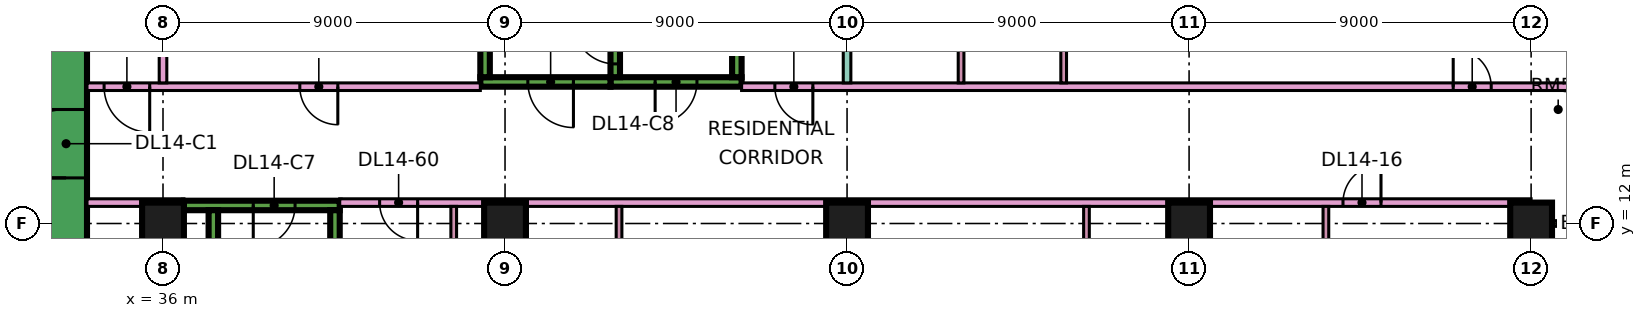
"""IFC4 building model, lengths in metres.
Left out: names, types, materials, properties, quantities, classifications, styles, units other than length and angle.
Written with IfcOpenShell. Run it as: python <this file> out.ifc"""

import sys

from ifc_helpers import new_model, si_unit, direction, frame, frame_2d, origin, origin_2d, place, context, subcontext, project, spatial, rectangle, extrude, element, fill, save


model = new_model("IFC4")
c1 = context("Model", 3, precision=1e-05, world=origin(), true_north=direction((0.0, 1.0)))
c2 = subcontext(c1, "Body", "Model", "MODEL_VIEW")
j1 = project(units=[si_unit("LENGTHUNIT", "METRE"), si_unit("PLANEANGLEUNIT", "RADIAN")], contexts=[c1])
p1 = place(None, origin())
s1 = spatial("IfcSite", under=j1, at=p1, CompositionType="ELEMENT")
p2 = place(p1, origin())
s2 = spatial("IfcBuilding", under=s1, at=p2, CompositionType="ELEMENT")
p3 = place(p2, frame((0.0, 0.0, 67.65)))
s3 = spatial("IfcBuildingStorey", under=s2, at=p3, CompositionType="ELEMENT", Elevation=67.65)
for number, where, z_axis, x_axis in (
    (1, (36.0, 12.0, 0.0), (0.0, 0.0, 1.0), (1.0, 0.0, 0.0)),
    (2, (45.0, 12.0, 0.0), (0.0, 0.0, 1.0), (1.0, 0.0, 0.0)),
    (3, (54.0, 12.0, 0.0), (0.0, 0.0, 1.0), (1.0, 0.0, 0.0)),
    (4, (63.0, 12.0, 0.0), (0.0, 0.0, 1.0), (1.0, 0.0, 0.0)),
    (5, (72.0, 12.0, 0.0), (0.0, 0.0, 1.0), (1.0, 0.0, 0.0)),
):
    element("IfcColumn", number, at=place(p3, frame(where, z_axis=z_axis, x_axis=x_axis)), inside=s3, PredefinedType="COLUMN", context=c2, shape_type="SweptSolid", body=[
        extrude(rectangle(XDim=1.1, YDim=1.1, at=origin_2d()), origin(), (0.0, 0.0, 1.0), 3.75),
    ])
p4 = place(p3, frame((33.45, 8.1, 0.0), z_axis=(0.0, 0.0, 1.0), x_axis=(0.0, 1.0, 0.0)))
e6 = element("IfcWall", 6, at=p4, inside=s3, PredefinedType="SHEAR", context=c2, shape_type="SweptSolid", body=[
    extrude(rectangle(XDim=10.8, YDim=1.1, at=frame_2d((5.4, 0.0))), origin(), (0.0, 0.0, 1.0), 3.75),
])
p5 = place(p4, frame((5.1, 0.0, 0.0)))
e7 = element("IfcOpeningElement", 7, at=p5, cuts=e6, PredefinedType="OPENING", context=c2, shape_type="SweptSolid", body=[
    extrude(rectangle(XDim=1.8, YDim=2.4, at=frame_2d((0.9, 1.2))), frame((0.0, 0.56, 0.0), z_axis=(0.0, -1.0, 0.0), x_axis=(1.0, 0.0, 0.0)), (0.0, 0.0, 1.0), 1.12),
])
p6 = place(p3, frame((36.55, 12.475, 0.0), z_axis=(0.0, 0.0, 1.0), x_axis=(1.0, 0.0, 0.0)))
e8 = element("IfcWall", 8, at=p6, inside=s3, PredefinedType="SHEAR", context=c2, shape_type="SweptSolid", body=[
    extrude(rectangle(XDim=4.1, YDim=0.25, at=frame_2d((2.05, 0.0))), origin(), (0.0, 0.0, 1.0), 3.75),
])
p7 = place(p6, frame((1.825, 0.0, 0.0)))
e9 = element("IfcOpeningElement", 9, at=p7, cuts=e8, PredefinedType="OPENING", context=c2, shape_type="SweptSolid", body=[
    extrude(rectangle(XDim=1.1, YDim=2.2, at=frame_2d((0.55, 1.1))), frame((0.0, 0.135, 0.0), z_axis=(0.0, -1.0, 0.0), x_axis=(1.0, 0.0, 0.0)), (0.0, 0.0, 1.0), 0.27),
])
for number, where, z_axis, x_axis in (
    (10, (37.325, 5.85, 0.0), (0.0, 0.0, 1.0), (0.0, 1.0, 0.0)),
    (11, (40.525, 5.85, 0.0), (0.0, 0.0, 1.0), (0.0, 1.0, 0.0)),
):
    element("IfcWall", number, at=place(p3, frame(where, z_axis=z_axis, x_axis=x_axis)), inside=s3, PredefinedType="SHEAR", context=c2, shape_type="SweptSolid", body=[
        extrude(rectangle(XDim=6.5, YDim=0.25, at=frame_2d((3.25, 0.0))), origin(), (0.0, 0.0, 1.0), 3.75),
    ])
p8 = place(p3, frame((47.775, 15.725, 0.0), z_axis=(0.0, 0.0, 1.0), x_axis=(1.0, 0.0, 0.0)))
e12 = element("IfcWall", 12, at=p8, inside=s3, PredefinedType="SHEAR", context=c2, shape_type="SweptSolid", body=[
    extrude(rectangle(XDim=3.45, YDim=0.25, at=frame_2d((1.725, 0.0))), origin(), (0.0, 0.0, 1.0), 3.75),
])
p9 = place(p8, frame((1.175, 0.0, 0.0)))
e13 = element("IfcOpeningElement", 13, at=p9, cuts=e12, PredefinedType="OPENING", context=c2, shape_type="SweptSolid", body=[
    extrude(rectangle(XDim=1.1, YDim=2.2, at=frame_2d((0.55, 1.1))), frame((0.0, 0.135, 0.0), z_axis=(0.0, -1.0, 0.0), x_axis=(1.0, 0.0, 0.0)), (0.0, 0.0, 1.0), 0.27),
])
p10 = place(p3, frame((47.9, 15.85, 0.0), z_axis=(0.0, 0.0, 1.0), x_axis=(0.0, 1.0, 0.0)))
e14 = element("IfcWall", 14, at=p10, inside=s3, PredefinedType="SHEAR", context=c2, shape_type="SweptSolid", body=[
    extrude(rectangle(XDim=6.5, YDim=0.25, at=frame_2d((3.25, 0.0))), origin(), (0.0, 0.0, 1.0), 3.75),
])
p11 = place(p10, frame((0.35, 0.0, 0.0)))
e15 = element("IfcOpeningElement", 15, at=p11, cuts=e14, PredefinedType="OPENING", context=c2, shape_type="SweptSolid", body=[
    extrude(rectangle(XDim=1.1, YDim=2.2, at=frame_2d((0.55, 1.1))), frame((0.0, 0.135, 0.0), z_axis=(0.0, -1.0, 0.0), x_axis=(1.0, 0.0, 0.0)), (0.0, 0.0, 1.0), 0.27),
])
p12 = place(p3, frame((51.1, 15.85, 0.0), z_axis=(0.0, 0.0, 1.0), x_axis=(0.0, 1.0, 0.0)))
e16 = element("IfcWall", 16, at=p12, inside=s3, PredefinedType="SHEAR", context=c2, shape_type="SweptSolid", body=[
    extrude(rectangle(XDim=6.5, YDim=0.25, at=frame_2d((3.25, 0.0))), origin(), (0.0, 0.0, 1.0), 3.75),
])
p13 = place(p3, frame((44.35, 15.725, 0.0), z_axis=(0.0, 0.0, 1.0), x_axis=(1.0, 0.0, 0.0)))
e17 = element("IfcWall", 17, at=p13, inside=s3, PredefinedType="SHEAR", context=c2, shape_type="SweptSolid", body=[
    extrude(rectangle(XDim=3.425, YDim=0.25, at=frame_2d((1.712, 0.0))), origin(), (0.0, 0.0, 1.0), 3.75),
])
p14 = place(p13, frame((1.25, 0.0, 0.0)))
e18 = element("IfcOpeningElement", 18, at=p14, cuts=e17, PredefinedType="OPENING", context=c2, shape_type="SweptSolid", body=[
    extrude(rectangle(XDim=1.2, YDim=2.2, at=frame_2d((0.6, 1.1))), frame((0.0, 0.135, 0.0), z_axis=(0.0, -1.0, 0.0), x_axis=(1.0, 0.0, 0.0)), (0.0, 0.0, 1.0), 0.27),
])
p15 = place(p3, frame((44.475, 15.85, 0.0), z_axis=(0.0, 0.0, 1.0), x_axis=(0.0, 1.0, 0.0)))
e19 = element("IfcWall", 19, at=p15, inside=s3, PredefinedType="SHEAR", context=c2, shape_type="SweptSolid", body=[
    extrude(rectangle(XDim=6.5, YDim=0.25, at=frame_2d((3.25, 0.0))), origin(), (0.0, 0.0, 1.0), 3.75),
])
p16 = place(p15, frame((1.75, 0.0, 0.0)))
e20 = element("IfcOpeningElement", 20, at=p16, cuts=e19, PredefinedType="OPENING", context=c2, shape_type="SweptSolid", body=[
    extrude(rectangle(XDim=1.1, YDim=2.2, at=frame_2d((0.55, 1.1))), frame((0.0, 0.135, 0.0), z_axis=(0.0, -1.0, 0.0), x_axis=(1.0, 0.0, 0.0)), (0.0, 0.0, 1.0), 0.27),
])
p17 = place(p15, frame((4.3, 0.0, 0.0)))
e21 = element("IfcOpeningElement", 21, at=p17, cuts=e19, PredefinedType="OPENING", context=c2, shape_type="SweptSolid", body=[
    extrude(rectangle(XDim=1.1, YDim=2.2, at=frame_2d((0.55, 1.1))), frame((0.0, 0.135, 0.0), z_axis=(0.0, -1.0, 0.0), x_axis=(1.0, 0.0, 0.0)), (0.0, 0.0, 1.0), 0.27),
])
p18 = place(p3, frame((72.0, 1.575, 0.0), z_axis=(0.0, 0.0, 1.0), x_axis=(0.0, 1.0, 0.0)))
e22 = element("IfcWall", 22, at=p18, inside=s3, PredefinedType="SOLIDWALL", context=c2, shape_type="SweptSolid", body=[
    extrude(rectangle(XDim=10.35, YDim=0.15, at=frame_2d((5.175, 0.0))), origin(), (0.0, 0.0, 1.0), 3.35),
])
p19 = place(p18, frame((1.587, 0.0, 0.0)))
e23 = element("IfcOpeningElement", 23, at=p19, cuts=e22, PredefinedType="OPENING", context=c2, shape_type="SweptSolid", body=[
    extrude(rectangle(XDim=1.8, YDim=2.4, at=frame_2d((0.9, 1.2))), frame((0.0, 0.085, 0.0), z_axis=(0.0, -1.0, 0.0), x_axis=(1.0, 0.0, 0.0)), (0.0, 0.0, 1.0), 0.17),
])
p20 = place(p18, frame((5.875, 0.0, 0.45)))
e24 = element("IfcOpeningElement", 24, at=p20, cuts=e22, PredefinedType="OPENING", context=c2, shape_type="SweptSolid", body=[
    extrude(rectangle(XDim=3.0, YDim=2.4, at=frame_2d((1.5, 1.2))), frame((0.0, 0.085, 0.0), z_axis=(0.0, -1.0, 0.0), x_axis=(1.0, 0.0, 0.0)), (0.0, 0.0, 1.0), 0.17),
])
p21 = place(p3, frame((73.5, 12.0, 0.0), z_axis=(0.0, 0.0, 1.0), x_axis=(-1.0, 0.0, 0.0)))
e25 = element("IfcWall", 25, at=p21, inside=s3, PredefinedType="SOLIDWALL", context=c2, shape_type="SweptSolid", body=[
    extrude(rectangle(XDim=1.5, YDim=0.15, at=frame_2d((0.75, 0.0))), origin(), (0.0, 0.0, 1.0), 3.35),
])
p22 = place(p3, frame((34.0, 12.55, 0.0), z_axis=(0.0, 0.0, 1.0), x_axis=(1.0, 0.0, 0.0)))
e26 = element("IfcWall", 26, at=p22, inside=s3, PredefinedType="PARTITIONING", context=c2, shape_type="SweptSolid", body=[
    extrude(rectangle(XDim=2.551, YDim=0.2, at=frame_2d((1.275, 0.0))), origin(), (0.0, 0.0, 1.0), 3.35),
])
p23 = place(p3, frame((34.0, 15.6, 0.0), z_axis=(0.0, 0.0, 1.0), x_axis=(1.0, 0.0, 0.0)))
e27 = element("IfcWall", 27, at=p23, inside=s3, PredefinedType="PARTITIONING", context=c2, shape_type="SweptSolid", body=[
    extrude(rectangle(XDim=10.35, YDim=0.2, at=frame_2d((5.175, 0.0))), origin(), (0.0, 0.0, 1.0), 3.35),
])
p24 = place(p23, frame((5.6, 0.0, 0.0)))
e28 = element("IfcOpeningElement", 28, at=p24, cuts=e27, PredefinedType="OPENING", context=c2, shape_type="SweptSolid", body=[
    extrude(rectangle(XDim=1.0, YDim=2.1, at=frame_2d((0.5, 1.05))), frame((0.0, 0.11, 0.0), z_axis=(0.0, -1.0, 0.0), x_axis=(1.0, 0.0, 0.0)), (0.0, 0.0, 1.0), 0.22),
])
p25 = place(p23, frame((0.45, 0.0, 0.0)))
e29 = element("IfcOpeningElement", 29, at=p25, cuts=e27, PredefinedType="OPENING", context=c2, shape_type="SweptSolid", body=[
    extrude(rectangle(XDim=1.2, YDim=2.1, at=frame_2d((0.6, 1.05))), frame((0.0, 0.11, 0.0), z_axis=(0.0, -1.0, 0.0), x_axis=(1.0, 0.0, 0.0)), (0.0, 0.0, 1.0), 0.22),
])
p26 = place(p3, frame((36.0, 15.7, 0.0), z_axis=(0.0, 0.0, 1.0), x_axis=(0.0, 1.0, 0.0)))
e30 = element("IfcWall", 30, at=p26, inside=s3, PredefinedType="PARTITIONING", context=c2, shape_type="SweptSolid", body=[
    extrude(rectangle(XDim=8.3, YDim=0.2, at=frame_2d((4.15, 0.0))), origin(), (0.0, 0.0, 1.0), 3.35),
])
p27 = place(p3, frame((40.65, 12.55, 0.0), z_axis=(0.0, 0.0, 1.0), x_axis=(1.0, 0.0, 0.0)))
e31 = element("IfcWall", 31, at=p27, inside=s3, PredefinedType="PARTITIONING", context=c2, shape_type="SweptSolid", body=[
    extrude(rectangle(XDim=31.35, YDim=0.2, at=frame_2d((15.675, 0.0))), origin(), (0.0, 0.0, 1.0), 3.35),
])
p28 = place(p27, frame((26.4, 0.0, 0.0)))
e32 = element("IfcOpeningElement", 32, at=p28, cuts=e31, PredefinedType="OPENING", context=c2, shape_type="SweptSolid", body=[
    extrude(rectangle(XDim=1.0, YDim=2.1, at=frame_2d((0.5, 1.05))), frame((0.0, 0.11, 0.0), z_axis=(0.0, -1.0, 0.0), x_axis=(1.0, 0.0, 0.0)), (0.0, 0.0, 1.0), 0.22),
])
p29 = place(p27, frame((1.05, 0.0, 0.0)))
e33 = element("IfcOpeningElement", 33, at=p29, cuts=e31, PredefinedType="OPENING", context=c2, shape_type="SweptSolid", body=[
    extrude(rectangle(XDim=1.0, YDim=2.1, at=frame_2d((0.5, 1.05))), frame((0.0, 0.11, 0.0), z_axis=(0.0, -1.0, 0.0), x_axis=(1.0, 0.0, 0.0)), (0.0, 0.0, 1.0), 0.22),
])
p30 = place(p3, frame((43.65, 5.975, 0.0), z_axis=(0.0, 0.0, 1.0), x_axis=(0.0, 1.0, 0.0)))
e34 = element("IfcWall", 34, at=p30, inside=s3, PredefinedType="PARTITIONING", context=c2, shape_type="SweptSolid", body=[
    extrude(rectangle(XDim=6.475, YDim=0.15, at=frame_2d((3.237, 0.0))), origin(), (0.0, 0.0, 1.0), 3.35),
])
p31 = place(p30, frame((4.275, 0.0, 0.0)))
e35 = element("IfcOpeningElement", 35, at=p31, cuts=e34, PredefinedType="OPENING", context=c2, shape_type="SweptSolid", body=[
    extrude(rectangle(XDim=0.9, YDim=2.1, at=frame_2d((0.45, 1.05))), frame((0.0, 0.085, 0.0), z_axis=(0.0, -1.0, 0.0), x_axis=(1.0, 0.0, 0.0)), (0.0, 0.0, 1.0), 0.17),
])
p32 = place(p3, frame((48.0, 5.975, 0.0), z_axis=(0.0, 0.0, 1.0), x_axis=(0.0, 1.0, 0.0)))
e36 = element("IfcWall", 36, at=p32, inside=s3, PredefinedType="PARTITIONING", context=c2, shape_type="SweptSolid", body=[
    extrude(rectangle(XDim=6.475, YDim=0.15, at=frame_2d((3.237, 0.0))), origin(), (0.0, 0.0, 1.0), 3.35),
])
p33 = place(p3, frame((51.225, 15.6, 0.0), z_axis=(0.0, 0.0, 1.0), x_axis=(1.0, 0.0, 0.0)))
e37 = element("IfcWall", 37, at=p33, inside=s3, PredefinedType="PARTITIONING", context=c2, shape_type="SweptSolid", body=[
    extrude(rectangle(XDim=22.125, YDim=0.2, at=frame_2d((11.062, 0.0))), origin(), (0.0, 0.0, 1.0), 3.35),
])
p34 = place(p33, frame((18.725, 0.0, 0.0)))
e38 = element("IfcOpeningElement", 38, at=p34, cuts=e37, PredefinedType="OPENING", context=c2, shape_type="SweptSolid", body=[
    extrude(rectangle(XDim=1.0, YDim=2.1, at=frame_2d((0.5, 1.05))), frame((0.0, 0.11, 0.0), z_axis=(0.0, -1.0, 0.0), x_axis=(1.0, 0.0, 0.0)), (0.0, 0.0, 1.0), 0.22),
])
p35 = place(p33, frame((0.875, 0.0, 0.0)))
e39 = element("IfcOpeningElement", 39, at=p35, cuts=e37, PredefinedType="OPENING", context=c2, shape_type="SweptSolid", body=[
    extrude(rectangle(XDim=1.0, YDim=2.1, at=frame_2d((0.5, 1.05))), frame((0.0, 0.11, 0.0), z_axis=(0.0, -1.0, 0.0), x_axis=(1.0, 0.0, 0.0)), (0.0, 0.0, 1.0), 0.22),
])
p36 = place(p3, frame((54.0, 0.074, 0.0), z_axis=(0.0, 0.0, 1.0), x_axis=(0.0, 1.0, 0.0)))
e40 = element("IfcWall", 40, at=p36, inside=s3, PredefinedType="PARTITIONING", context=c2, shape_type="SweptSolid", body=[
    extrude(rectangle(XDim=12.376, YDim=0.2, at=frame_2d((6.188, 0.0))), origin(), (0.0, 0.0, 1.0), 3.35),
])
p37 = place(p3, frame((54.0, 15.7, 0.0), z_axis=(0.0, 0.0, 1.0), x_axis=(0.0, 1.0, 0.0)))
e41 = element("IfcWall", 41, at=p37, inside=s3, PredefinedType="PARTITIONING", context=c2, shape_type="SweptSolid", body=[
    extrude(rectangle(XDim=8.226, YDim=0.2, at=frame_2d((4.113, 0.0))), origin(), (0.0, 0.0, 1.0), 3.35),
])
p38 = place(p3, frame((57.0, 15.7, 0.0), z_axis=(0.0, 0.0, 1.0), x_axis=(0.0, 1.0, 0.0)))
e42 = element("IfcWall", 42, at=p38, inside=s3, PredefinedType="PARTITIONING", context=c2, shape_type="SweptSolid", body=[
    extrude(rectangle(XDim=2.825, YDim=0.15, at=frame_2d((1.413, 0.0))), origin(), (0.0, 0.0, 1.0), 3.35),
])
p39 = place(p3, frame((59.7, 15.7, 0.0), z_axis=(0.0, 0.0, 1.0), x_axis=(0.0, 1.0, 0.0)))
e43 = element("IfcWall", 43, at=p39, inside=s3, PredefinedType="PARTITIONING", context=c2, shape_type="SweptSolid", body=[
    extrude(rectangle(XDim=2.825, YDim=0.15, at=frame_2d((1.413, 0.0))), origin(), (0.0, 0.0, 1.0), 3.35),
])
p40 = place(p39, frame((1.05, 0.0, 0.0)))
e44 = element("IfcOpeningElement", 44, at=p40, cuts=e43, PredefinedType="OPENING", context=c2, shape_type="SweptSolid", body=[
    extrude(rectangle(XDim=0.8, YDim=2.1, at=frame_2d((0.4, 1.05))), frame((0.0, 0.085, 0.0), z_axis=(0.0, -1.0, 0.0), x_axis=(1.0, 0.0, 0.0)), (0.0, 0.0, 1.0), 0.17),
])
for number, where, z_axis, x_axis in (
    (45, (60.3, 7.825, 0.0), (0.0, 0.0, 1.0), (0.0, 1.0, 0.0)),
    (46, (62.7, 7.825, 0.0), (0.0, 0.0, 1.0), (0.0, 1.0, 0.0)),
    (47, (66.6, 7.825, 0.0), (0.0, 0.0, 1.0), (0.0, 1.0, 0.0)),
):
    element("IfcWall", number, at=place(p3, frame(where, z_axis=z_axis, x_axis=x_axis)), inside=s3, PredefinedType="PARTITIONING", context=c2, shape_type="SweptSolid", body=[
        extrude(rectangle(XDim=4.625, YDim=0.15, at=frame_2d((2.312, 0.0))), origin(), (0.0, 0.0, 1.0), 3.35),
    ])
p41 = place(p5, origin())
e48 = element("IfcDoor", 48, at=p41, inside=s3, OperationType="DOUBLE_DOOR_SINGLE_SWING", PredefinedType="DOOR", context=c2, shape_type="SweptSolid", body=[
    extrude(rectangle(XDim=1.8, YDim=2.4, at=frame_2d((0.9, 1.2))), frame((0.0, 0.025, 0.0), z_axis=(0.0, -1.0, 0.0), x_axis=(1.0, 0.0, 0.0)), (0.0, 0.0, 1.0), 0.05),
])
fill(e7, e48)
p42 = place(p7, frame((1.1, 0.0, 0.0), z_axis=(0.0, 0.0, 1.0), x_axis=(-1.0, 0.0, 0.0)))
e49 = element("IfcDoor", 49, at=p42, inside=s3, OperationType="SINGLE_SWING_LEFT", PredefinedType="DOOR", context=c2, shape_type="SweptSolid", body=[
    extrude(rectangle(XDim=1.1, YDim=2.2, at=frame_2d((0.55, 1.1))), frame((0.0, 0.025, 0.0), z_axis=(0.0, -1.0, 0.0), x_axis=(1.0, 0.0, 0.0)), (0.0, 0.0, 1.0), 0.05),
])
fill(e9, e49)
p43 = place(p9, frame((1.1, 0.0, 0.0), z_axis=(0.0, 0.0, 1.0), x_axis=(-1.0, 0.0, 0.0)))
e50 = element("IfcDoor", 50, at=p43, inside=s3, OperationType="SINGLE_SWING_LEFT", PredefinedType="DOOR", context=c2, shape_type="SweptSolid", body=[
    extrude(rectangle(XDim=1.1, YDim=2.2, at=frame_2d((0.55, 1.1))), frame((0.0, 0.025, 0.0), z_axis=(0.0, -1.0, 0.0), x_axis=(1.0, 0.0, 0.0)), (0.0, 0.0, 1.0), 0.05),
])
fill(e13, e50)
p44 = place(p14, origin())
e51 = element("IfcDoor", 51, at=p44, inside=s3, OperationType="SINGLE_SWING_RIGHT", PredefinedType="DOOR", context=c2, shape_type="SweptSolid", body=[
    extrude(rectangle(XDim=1.2, YDim=2.2, at=frame_2d((0.6, 1.1))), frame((0.0, 0.025, 0.0), z_axis=(0.0, -1.0, 0.0), x_axis=(1.0, 0.0, 0.0)), (0.0, 0.0, 1.0), 0.05),
])
fill(e18, e51)
p45 = place(p11, frame((1.1, 0.0, 0.0), z_axis=(0.0, 0.0, 1.0), x_axis=(-1.0, 0.0, 0.0)))
e52 = element("IfcDoor", 52, at=p45, inside=s3, OperationType="SINGLE_SWING_RIGHT", PredefinedType="DOOR", context=c2, shape_type="SweptSolid", body=[
    extrude(rectangle(XDim=1.1, YDim=2.2, at=frame_2d((0.55, 1.1))), frame((0.0, 0.025, 0.0), z_axis=(0.0, -1.0, 0.0), x_axis=(1.0, 0.0, 0.0)), (0.0, 0.0, 1.0), 0.05),
])
fill(e15, e52)
p46 = place(p24, origin())
e53 = element("IfcDoor", 53, at=p46, inside=s3, OperationType="SINGLE_SWING_RIGHT", PredefinedType="DOOR", context=c2, shape_type="SweptSolid", body=[
    extrude(rectangle(XDim=1.0, YDim=2.1, at=frame_2d((0.5, 1.05))), frame((0.0, 0.025, 0.0), z_axis=(0.0, -1.0, 0.0), x_axis=(1.0, 0.0, 0.0)), (0.0, 0.0, 1.0), 0.05),
])
fill(e28, e53)
p47 = place(p34, origin())
e54 = element("IfcDoor", 54, at=p47, inside=s3, OperationType="SINGLE_SWING_LEFT", PredefinedType="DOOR", context=c2, shape_type="SweptSolid", body=[
    extrude(rectangle(XDim=1.0, YDim=2.1, at=frame_2d((0.5, 1.05))), frame((0.0, 0.025, 0.0), z_axis=(0.0, -1.0, 0.0), x_axis=(1.0, 0.0, 0.0)), (0.0, 0.0, 1.0), 0.05),
])
fill(e38, e54)
p48 = place(p28, frame((1.0, 0.0, 0.0), z_axis=(0.0, 0.0, 1.0), x_axis=(-1.0, 0.0, 0.0)))
e55 = element("IfcDoor", 55, at=p48, inside=s3, OperationType="SINGLE_SWING_RIGHT", PredefinedType="DOOR", context=c2, shape_type="SweptSolid", body=[
    extrude(rectangle(XDim=1.0, YDim=2.1, at=frame_2d((0.5, 1.05))), frame((0.0, 0.025, 0.0), z_axis=(0.0, -1.0, 0.0), x_axis=(1.0, 0.0, 0.0)), (0.0, 0.0, 1.0), 0.05),
])
fill(e32, e55)
p49 = place(p25, origin())
e56 = element("IfcDoor", 56, at=p49, inside=s3, OperationType="SINGLE_SWING_RIGHT", PredefinedType="DOOR", context=c2, shape_type="SweptSolid", body=[
    extrude(rectangle(XDim=1.2, YDim=2.1, at=frame_2d((0.6, 1.05))), frame((0.0, 0.025, 0.0), z_axis=(0.0, -1.0, 0.0), x_axis=(1.0, 0.0, 0.0)), (0.0, 0.0, 1.0), 0.05),
])
fill(e29, e56)
p50 = place(p35, origin())
e57 = element("IfcDoor", 57, at=p50, inside=s3, OperationType="SINGLE_SWING_RIGHT", PredefinedType="DOOR", context=c2, shape_type="SweptSolid", body=[
    extrude(rectangle(XDim=1.0, YDim=2.1, at=frame_2d((0.5, 1.05))), frame((0.0, 0.025, 0.0), z_axis=(0.0, -1.0, 0.0), x_axis=(1.0, 0.0, 0.0)), (0.0, 0.0, 1.0), 0.05),
])
fill(e39, e57)
p51 = place(p29, origin())
e58 = element("IfcDoor", 58, at=p51, inside=s3, OperationType="SINGLE_SWING_RIGHT", PredefinedType="DOOR", context=c2, shape_type="SweptSolid", body=[
    extrude(rectangle(XDim=1.0, YDim=2.1, at=frame_2d((0.5, 1.05))), frame((0.0, 0.025, 0.0), z_axis=(0.0, -1.0, 0.0), x_axis=(1.0, 0.0, 0.0)), (0.0, 0.0, 1.0), 0.05),
])
fill(e33, e58)
save(model, sys.argv[1])
